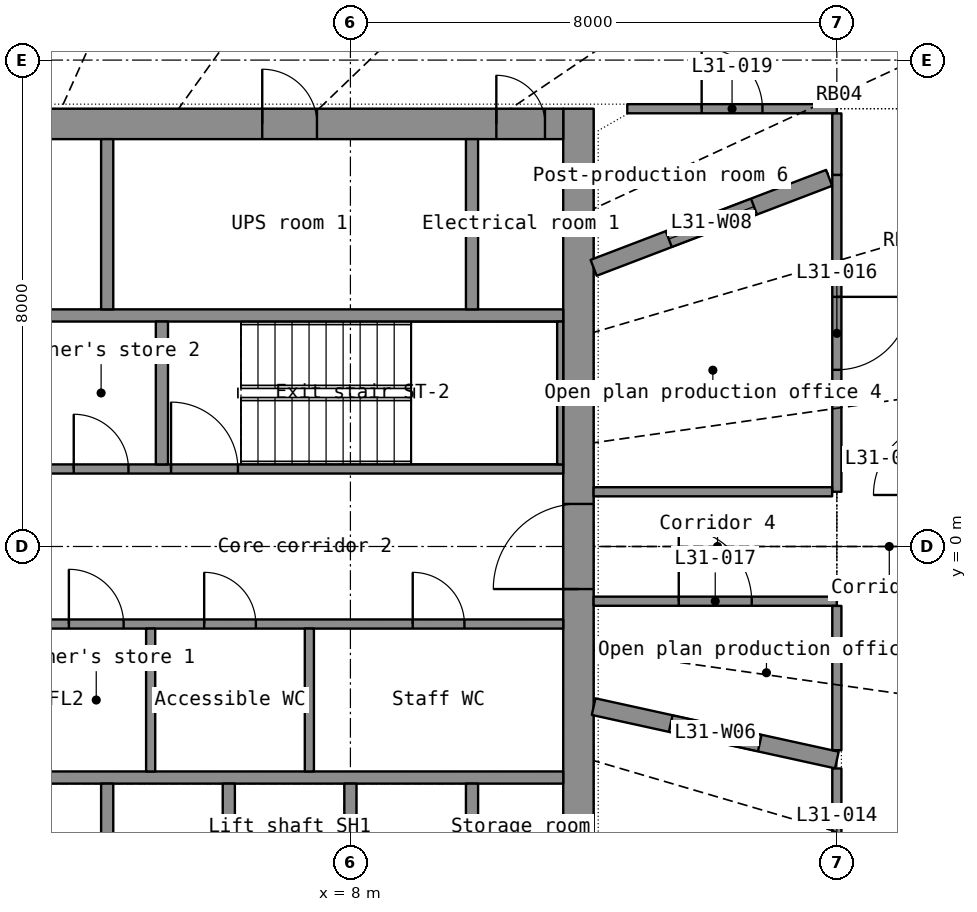
"""IFC4 building model, lengths in metres.
Left out: names, types, materials, properties, quantities, classifications, styles, units other than length and angle.
Written with IfcOpenShell. Run it as: python <this file> out.ifc"""

import sys

from ifc_helpers import new_model, si_unit, direction, frame, frame_2d, origin, place, context, subcontext, project, spatial, rectangle, extrude, element, fill, save


model = new_model("IFC4")
c1 = context("Model", 3, precision=1e-05, world=origin(), true_north=direction((0.0, 1.0)))
c2 = subcontext(c1, "Body", "Model", "MODEL_VIEW")
j1 = project(units=[si_unit("LENGTHUNIT", "METRE"), si_unit("PLANEANGLEUNIT", "RADIAN")], contexts=[c1])
p1 = place(None, origin())
s1 = spatial("IfcSite", under=j1, at=p1, CompositionType="ELEMENT")
p2 = place(p1, origin())
s2 = spatial("IfcBuilding", under=s1, at=p2, CompositionType="ELEMENT")
p3 = place(p2, frame((0.0, 0.0, 130.4)))
s3 = spatial("IfcBuildingStorey", under=s2, at=p3, CompositionType="ELEMENT", Elevation=130.4)
p4 = place(p3, frame((11.75, -7.2, 0.0), z_axis=(0.0, 0.0, 1.0), x_axis=(0.0, 1.0, 0.0)))
e1 = element("IfcWall", 1, at=p4, inside=s3, PredefinedType="SHEAR", context=c2, shape_type="SweptSolid", body=[
    extrude(rectangle(XDim=14.4, YDim=0.5, at=frame_2d((7.2, 0.0))), origin(), (0.0, 0.0, 1.0), 3.3),
])
p5 = place(p4, frame((6.5, 0.0, 0.0)))
e2 = element("IfcOpeningElement", 2, at=p5, cuts=e1, PredefinedType="OPENING", context=c2, shape_type="SweptSolid", body=[
    extrude(rectangle(XDim=1.4, YDim=2.2, at=frame_2d((0.7, 1.1))), frame((0.0, 0.26, 0.0), z_axis=(0.0, -1.0, 0.0), x_axis=(1.0, 0.0, 0.0)), (0.0, 0.0, 1.0), 0.52),
])
p6 = place(p3, frame((-11.5, 6.95, 0.0), z_axis=(0.0, 0.0, 1.0), x_axis=(1.0, 0.0, 0.0)))
e3 = element("IfcWall", 3, at=p6, inside=s3, PredefinedType="SHEAR", context=c2, shape_type="SweptSolid", body=[
    extrude(rectangle(XDim=23.0, YDim=0.5, at=frame_2d((11.5, 0.0))), origin(), (0.0, 0.0, 1.0), 3.3),
])
p7 = place(p6, frame((1.95, 0.0, 0.0)))
e4 = element("IfcOpeningElement", 4, at=p7, cuts=e3, PredefinedType="OPENING", context=c2, shape_type="SweptSolid", body=[
    extrude(rectangle(XDim=1.1, YDim=2.2, at=frame_2d((0.55, 1.1))), frame((0.0, 0.26, 0.0), z_axis=(0.0, -1.0, 0.0), x_axis=(1.0, 0.0, 0.0)), (0.0, 0.0, 1.0), 0.52),
])
p8 = place(p6, frame((10.05, 0.0, 0.0)))
e5 = element("IfcOpeningElement", 5, at=p8, cuts=e3, PredefinedType="OPENING", context=c2, shape_type="SweptSolid", body=[
    extrude(rectangle(XDim=0.9, YDim=2.1, at=frame_2d((0.45, 1.05))), frame((0.0, 0.26, 0.0), z_axis=(0.0, -1.0, 0.0), x_axis=(1.0, 0.0, 0.0)), (0.0, 0.0, 1.0), 0.52),
])
p9 = place(p6, frame((18.05, 0.0, 0.0)))
e6 = element("IfcOpeningElement", 6, at=p9, cuts=e3, PredefinedType="OPENING", context=c2, shape_type="SweptSolid", body=[
    extrude(rectangle(XDim=0.9, YDim=2.1, at=frame_2d((0.45, 1.05))), frame((0.0, 0.26, 0.0), z_axis=(0.0, -1.0, 0.0), x_axis=(1.0, 0.0, 0.0)), (0.0, 0.0, 1.0), 0.52),
])
p10 = place(p6, frame((0.3, 0.0, 0.0)))
e7 = element("IfcOpeningElement", 7, at=p10, cuts=e3, PredefinedType="OPENING", context=c2, shape_type="SweptSolid", body=[
    extrude(rectangle(XDim=0.8, YDim=2.05, at=frame_2d((0.4, 1.025))), frame((0.0, 0.26, 0.0), z_axis=(0.0, -1.0, 0.0), x_axis=(1.0, 0.0, 0.0)), (0.0, 0.0, 1.0), 0.52),
])
p11 = place(p6, frame((21.9, 0.0, 0.0)))
e8 = element("IfcOpeningElement", 8, at=p11, cuts=e3, PredefinedType="OPENING", context=c2, shape_type="SweptSolid", body=[
    extrude(rectangle(XDim=0.8, YDim=2.05, at=frame_2d((0.4, 1.025))), frame((0.0, 0.26, 0.0), z_axis=(0.0, -1.0, 0.0), x_axis=(1.0, 0.0, 0.0)), (0.0, 0.0, 1.0), 0.52),
])
for number, where, z_axis, x_axis in (
    (9, (-11.5, -3.8, 0.0), (0.0, 0.0, 1.0), (1.0, 0.0, 0.0)),
    (10, (-11.5, 3.8, 0.0), (0.0, 0.0, 1.0), (1.0, 0.0, 0.0)),
):
    element("IfcWall", number, at=place(p3, frame(where, z_axis=z_axis, x_axis=x_axis)), inside=s3, PredefinedType="SHEAR", context=c2, shape_type="SweptSolid", body=[
        extrude(rectangle(XDim=23.0, YDim=0.2, at=frame_2d((11.5, 0.0))), origin(), (0.0, 0.0, 1.0), 3.3),
    ])
for number, where, z_axis, x_axis in (
    (11, (4.0, -6.7, 0.0), (0.0, 0.0, 1.0), (0.0, 1.0, 0.0)),
    (12, (6.0, -6.7, 0.0), (0.0, 0.0, 1.0), (0.0, 1.0, 0.0)),
    (13, (8.0, -6.7, 0.0), (0.0, 0.0, 1.0), (0.0, 1.0, 0.0)),
    (14, (10.0, -6.7, 0.0), (0.0, 0.0, 1.0), (0.0, 1.0, 0.0)),
    (15, (10.0, 3.9, 0.0), (0.0, 0.0, 1.0), (0.0, 1.0, 0.0)),
):
    element("IfcWall", number, at=place(p3, frame(where, z_axis=z_axis, x_axis=x_axis)), inside=s3, PredefinedType="SHEAR", context=c2, shape_type="SweptSolid", body=[
        extrude(rectangle(XDim=2.8, YDim=0.2, at=frame_2d((1.4, 0.0))), origin(), (0.0, 0.0, 1.0), 3.3),
    ])
p12 = place(p3, frame((4.0, 3.9, 0.0), z_axis=(0.0, 0.0, 1.0), x_axis=(0.0, 1.0, 0.0)))
e16 = element("IfcWall", 16, at=p12, inside=s3, PredefinedType="PARTITIONING", context=c2, shape_type="SweptSolid", body=[
    extrude(rectangle(XDim=2.8, YDim=0.2, at=frame_2d((1.4, 0.0))), origin(), (0.0, 0.0, 1.0), 3.3),
])
p13 = place(p3, frame((3.0, -1.275, 0.0), z_axis=(0.0, 0.0, 1.0), x_axis=(1.0, 0.0, 0.0)))
e17 = element("IfcWall", 17, at=p13, inside=s3, PredefinedType="PARTITIONING", context=c2, shape_type="SweptSolid", body=[
    extrude(rectangle(XDim=8.5, YDim=0.15, at=frame_2d((4.25, 0.0))), origin(), (0.0, 0.0, 1.0), 3.3),
])
p14 = place(p13, frame((0.37, 0.0, 0.0)))
e18 = element("IfcOpeningElement", 18, at=p14, cuts=e17, PredefinedType="OPENING", context=c2, shape_type="SweptSolid", body=[
    extrude(rectangle(XDim=0.9, YDim=2.1, at=frame_2d((0.45, 1.05))), frame((0.0, 0.085, 0.0), z_axis=(0.0, -1.0, 0.0), x_axis=(1.0, 0.0, 0.0)), (0.0, 0.0, 1.0), 0.17),
])
p15 = place(p13, frame((2.595, 0.0, 0.0)))
e19 = element("IfcOpeningElement", 19, at=p15, cuts=e17, PredefinedType="OPENING", context=c2, shape_type="SweptSolid", body=[
    extrude(rectangle(XDim=0.85, YDim=2.1, at=frame_2d((0.425, 1.05))), frame((0.0, 0.085, 0.0), z_axis=(0.0, -1.0, 0.0), x_axis=(1.0, 0.0, 0.0)), (0.0, 0.0, 1.0), 0.17),
])
p16 = place(p13, frame((6.025, 0.0, 0.0)))
e20 = element("IfcOpeningElement", 20, at=p16, cuts=e17, PredefinedType="OPENING", context=c2, shape_type="SweptSolid", body=[
    extrude(rectangle(XDim=0.85, YDim=2.1, at=frame_2d((0.425, 1.05))), frame((0.0, 0.085, 0.0), z_axis=(0.0, -1.0, 0.0), x_axis=(1.0, 0.0, 0.0)), (0.0, 0.0, 1.0), 0.17),
])
p17 = place(p3, frame((3.0, 1.275, 0.0), z_axis=(0.0, 0.0, 1.0), x_axis=(1.0, 0.0, 0.0)))
e21 = element("IfcWall", 21, at=p17, inside=s3, PredefinedType="SHEAR", context=c2, shape_type="SweptSolid", body=[
    extrude(rectangle(XDim=8.5, YDim=0.15, at=frame_2d((4.25, 0.0))), origin(), (0.0, 0.0, 1.0), 3.3),
])
p18 = place(p17, frame((2.05, 0.0, 0.0)))
e22 = element("IfcOpeningElement", 22, at=p18, cuts=e21, PredefinedType="OPENING", context=c2, shape_type="SweptSolid", body=[
    extrude(rectangle(XDim=1.1, YDim=2.15, at=frame_2d((0.55, 1.075))), frame((0.0, 0.085, 0.0), z_axis=(0.0, -1.0, 0.0), x_axis=(1.0, 0.0, 0.0)), (0.0, 0.0, 1.0), 0.17),
])
p19 = place(p17, frame((0.45, 0.0, 0.0)))
e23 = element("IfcOpeningElement", 23, at=p19, cuts=e21, PredefinedType="OPENING", context=c2, shape_type="SweptSolid", body=[
    extrude(rectangle(XDim=0.9, YDim=2.1, at=frame_2d((0.45, 1.05))), frame((0.0, 0.085, 0.0), z_axis=(0.0, -1.0, 0.0), x_axis=(1.0, 0.0, 0.0)), (0.0, 0.0, 1.0), 0.17),
])
p20 = place(p3, frame((11.45, 1.35, 0.0), z_axis=(0.0, 0.0, 1.0), x_axis=(0.0, 1.0, 0.0)))
e24 = element("IfcWall", 24, at=p20, inside=s3, PredefinedType="SHEAR", context=c2, shape_type="SweptSolid", body=[
    extrude(rectangle(XDim=2.35, YDim=0.1, at=frame_2d((1.175, 0.0))), origin(), (0.0, 0.0, 1.0), 3.3),
])
p21 = place(p3, frame((4.9, 1.35, 0.0), z_axis=(0.0, 0.0, 1.0), x_axis=(0.0, 1.0, 0.0)))
e25 = element("IfcWall", 25, at=p21, inside=s3, PredefinedType="SHEAR", context=c2, shape_type="SweptSolid", body=[
    extrude(rectangle(XDim=2.35, YDim=0.2, at=frame_2d((1.175, 0.0))), origin(), (0.0, 0.0, 1.0), 3.3),
])
for number, where, z_axis, x_axis in (
    (26, (4.715, -3.7, 0.0), (0.0, 0.0, 1.0), (0.0, 1.0, 0.0)),
    (27, (7.325, -3.7, 0.0), (0.0, 0.0, 1.0), (0.0, 1.0, 0.0)),
):
    element("IfcWall", number, at=place(p3, frame(where, z_axis=z_axis, x_axis=x_axis)), inside=s3, PredefinedType="PARTITIONING", context=c2, shape_type="SweptSolid", body=[
        extrude(rectangle(XDim=2.35, YDim=0.15, at=frame_2d((1.175, 0.0))), origin(), (0.0, 0.0, 1.0), 3.3),
    ])
p22 = place(p3, frame((16.0, 6.111, 0.0), z_axis=(0.0, 0.0, 1.0), x_axis=(0.0, -1.0, 0.0)))
e28 = element("IfcWall", 28, at=p22, inside=s3, PredefinedType="PARTITIONING", context=c2, shape_type="SweptSolid", body=[
    extrude(rectangle(XDim=5.211, YDim=0.15, at=frame_2d((2.606, 0.0))), origin(), (0.0, 0.0, 1.0), 2.4),
])
p23 = place(p22, frame((2.006, 0.0, 0.0)))
e29 = element("IfcOpeningElement", 29, at=p23, cuts=e28, PredefinedType="OPENING", context=c2, shape_type="SweptSolid", body=[
    extrude(rectangle(XDim=1.2, YDim=2.2, at=frame_2d((0.6, 1.1))), frame((0.0, 0.085, 0.0), z_axis=(0.0, -1.0, 0.0), x_axis=(1.0, 0.0, 0.0)), (0.0, 0.0, 1.0), 0.17),
])
p24 = place(p3, frame((15.873, 6.063, 0.0), z_axis=(0.0, 0.0, 1.0), x_axis=(-0.934170215, -0.356827703, 0.0)))
e30 = element("IfcWall", 30, at=p24, inside=s3, PredefinedType="PARTITIONING", context=c2, shape_type="SweptSolid", body=[
    extrude(rectangle(XDim=4.146, YDim=0.28, at=frame_2d((2.073, 0.0))), origin(), (0.0, 0.0, 1.0), 2.4),
])
p25 = place(p24, frame((1.323, 0.0, 1.0)))
e31 = element("IfcOpeningElement", 31, at=p25, cuts=e30, PredefinedType="OPENING", context=c2, shape_type="SweptSolid", body=[
    extrude(rectangle(XDim=1.5, YDim=1.2, at=frame_2d((0.75, 0.6))), frame((0.0, 0.15, 0.0), z_axis=(0.0, -1.0, 0.0), x_axis=(1.0, 0.0, 0.0)), (0.0, 0.0, 1.0), 0.3),
])
p26 = place(p3, frame((16.0, -3.512, 0.0), z_axis=(0.0, 0.0, 1.0), x_axis=(-0.976750433, 0.214379551, 0.0)))
e32 = element("IfcWall", 32, at=p26, inside=s3, PredefinedType="PARTITIONING", context=c2, shape_type="SweptSolid", body=[
    extrude(rectangle(XDim=4.095, YDim=0.28, at=frame_2d((2.048, 0.0))), origin(), (0.0, 0.0, 1.0), 2.4),
])
p27 = place(p26, frame((1.298, 0.0, 1.0)))
e33 = element("IfcOpeningElement", 33, at=p27, cuts=e32, PredefinedType="OPENING", context=c2, shape_type="SweptSolid", body=[
    extrude(rectangle(XDim=1.5, YDim=1.2, at=frame_2d((0.75, 0.6))), frame((0.0, 0.15, 0.0), z_axis=(0.0, -1.0, 0.0), x_axis=(1.0, 0.0, 0.0)), (0.0, 0.0, 1.0), 0.3),
])
p28 = place(p3, frame((12.0, -0.9, 0.0), z_axis=(0.0, 0.0, 1.0), x_axis=(1.0, 0.0, 0.0)))
e34 = element("IfcWall", 34, at=p28, inside=s3, PredefinedType="PARTITIONING", context=c2, shape_type="SweptSolid", body=[
    extrude(rectangle(XDim=4.0, YDim=0.15, at=frame_2d((2.0, 0.0))), origin(), (0.0, 0.0, 1.0), 2.4),
])
p29 = place(p28, frame((1.4, 0.0, 0.0)))
e35 = element("IfcOpeningElement", 35, at=p29, cuts=e34, PredefinedType="OPENING", context=c2, shape_type="SweptSolid", body=[
    extrude(rectangle(XDim=1.2, YDim=2.2, at=frame_2d((0.6, 1.1))), frame((0.0, 0.085, 0.0), z_axis=(0.0, -1.0, 0.0), x_axis=(1.0, 0.0, 0.0)), (0.0, 0.0, 1.0), 0.17),
])
p30 = place(p3, frame((15.923, 0.9, 0.0), z_axis=(0.0, 0.0, 1.0), x_axis=(-1.0, 0.0, 0.0)))
e36 = element("IfcWall", 36, at=p30, inside=s3, PredefinedType="PARTITIONING", context=c2, shape_type="SweptSolid", body=[
    extrude(rectangle(XDim=3.923, YDim=0.15, at=frame_2d((1.961, 0.0))), origin(), (0.0, 0.0, 1.0), 2.4),
])
p31 = place(p3, frame((16.0, -3.65, 0.0), z_axis=(0.0, 0.0, 1.0), x_axis=(0.0, -1.0, 0.0)))
e37 = element("IfcWall", 37, at=p31, inside=s3, PredefinedType="PARTITIONING", context=c2, shape_type="SweptSolid", body=[
    extrude(rectangle(XDim=3.55, YDim=0.15, at=frame_2d((1.775, 0.0))), origin(), (0.0, 0.0, 1.0), 2.4),
])
p32 = place(p31, frame((1.275, 0.0, 0.0)))
e38 = element("IfcOpeningElement", 38, at=p32, cuts=e37, PredefinedType="OPENING", context=c2, shape_type="SweptSolid", body=[
    extrude(rectangle(XDim=1.0, YDim=2.2, at=frame_2d((0.5, 1.1))), frame((0.0, 0.085, 0.0), z_axis=(0.0, -1.0, 0.0), x_axis=(1.0, 0.0, 0.0)), (0.0, 0.0, 1.0), 0.17),
])
p33 = place(p3, frame((12.553, 7.2, 0.0), z_axis=(0.0, 0.0, 1.0), x_axis=(1.0, 0.0, 0.0)))
e39 = element("IfcWall", 39, at=p33, inside=s3, PredefinedType="PARTITIONING", context=c2, shape_type="SweptSolid", body=[
    extrude(rectangle(XDim=3.447, YDim=0.15, at=frame_2d((1.723, 0.0))), origin(), (0.0, 0.0, 1.0), 2.4),
])
p34 = place(p33, frame((1.223, 0.0, 0.0)))
e40 = element("IfcOpeningElement", 40, at=p34, cuts=e39, PredefinedType="OPENING", context=c2, shape_type="SweptSolid", body=[
    extrude(rectangle(XDim=1.0, YDim=2.2, at=frame_2d((0.5, 1.1))), frame((0.0, 0.085, 0.0), z_axis=(0.0, -1.0, 0.0), x_axis=(1.0, 0.0, 0.0)), (0.0, 0.0, 1.0), 0.17),
])
p35 = place(p3, frame((16.0, -0.977, 0.0), z_axis=(0.0, 0.0, 1.0), x_axis=(0.0, -1.0, 0.0)))
e41 = element("IfcWall", 41, at=p35, inside=s3, PredefinedType="PARTITIONING", context=c2, shape_type="SweptSolid", body=[
    extrude(rectangle(XDim=2.373, YDim=0.15, at=frame_2d((1.187, 0.0))), origin(), (0.0, 0.0, 1.0), 2.4),
])
p36 = place(p3, frame((16.0, 7.123, 0.0), z_axis=(0.0, 0.0, 1.0), x_axis=(0.0, -1.0, 0.0)))
e42 = element("IfcWall", 42, at=p36, inside=s3, PredefinedType="PARTITIONING", context=c2, shape_type="SweptSolid", body=[
    extrude(rectangle(XDim=1.011, YDim=0.15, at=frame_2d((0.505, 0.0))), origin(), (0.0, 0.0, 1.0), 2.4),
])
p37 = place(p9, origin())
e43 = element("IfcDoor", 43, at=p37, inside=s3, OperationType="SINGLE_SWING_LEFT", PredefinedType="DOOR", context=c2, shape_type="SweptSolid", body=[
    extrude(rectangle(XDim=0.9, YDim=2.1, at=frame_2d((0.45, 1.05))), frame((0.0, 0.025, 0.0), z_axis=(0.0, -1.0, 0.0), x_axis=(1.0, 0.0, 0.0)), (0.0, 0.0, 1.0), 0.05),
])
fill(e6, e43)
p38 = place(p11, origin())
e44 = element("IfcDoor", 44, at=p38, inside=s3, OperationType="SINGLE_SWING_LEFT", PredefinedType="DOOR", context=c2, shape_type="SweptSolid", body=[
    extrude(rectangle(XDim=0.8, YDim=2.05, at=frame_2d((0.4, 1.025))), frame((0.0, 0.025, 0.0), z_axis=(0.0, -1.0, 0.0), x_axis=(1.0, 0.0, 0.0)), (0.0, 0.0, 1.0), 0.05),
])
fill(e8, e44)
p39 = place(p5, origin())
e45 = element("IfcDoor", 45, at=p39, inside=s3, OperationType="DOUBLE_DOOR_SINGLE_SWING", PredefinedType="DOOR", context=c2, shape_type="SweptSolid", body=[
    extrude(rectangle(XDim=1.4, YDim=2.2, at=frame_2d((0.7, 1.1))), frame((0.0, 0.025, 0.0), z_axis=(0.0, -1.0, 0.0), x_axis=(1.0, 0.0, 0.0)), (0.0, 0.0, 1.0), 0.05),
])
fill(e2, e45)
p40 = place(p18, origin())
e46 = element("IfcDoor", 46, at=p40, inside=s3, OperationType="SINGLE_SWING_LEFT", PredefinedType="DOOR", context=c2, shape_type="SweptSolid", body=[
    extrude(rectangle(XDim=1.1, YDim=2.15, at=frame_2d((0.55, 1.075))), frame((0.0, 0.025, 0.0), z_axis=(0.0, -1.0, 0.0), x_axis=(1.0, 0.0, 0.0)), (0.0, 0.0, 1.0), 0.05),
])
fill(e22, e46)
p41 = place(p14, origin())
e47 = element("IfcDoor", 47, at=p41, inside=s3, OperationType="SINGLE_SWING_LEFT", PredefinedType="DOOR", context=c2, shape_type="SweptSolid", body=[
    extrude(rectangle(XDim=0.9, YDim=2.1, at=frame_2d((0.45, 1.05))), frame((0.0, 0.025, 0.0), z_axis=(0.0, -1.0, 0.0), x_axis=(1.0, 0.0, 0.0)), (0.0, 0.0, 1.0), 0.05),
])
fill(e18, e47)
p42 = place(p15, origin())
e48 = element("IfcDoor", 48, at=p42, inside=s3, OperationType="SINGLE_SWING_LEFT", PredefinedType="DOOR", context=c2, shape_type="SweptSolid", body=[
    extrude(rectangle(XDim=0.85, YDim=2.1, at=frame_2d((0.425, 1.05))), frame((0.0, 0.025, 0.0), z_axis=(0.0, -1.0, 0.0), x_axis=(1.0, 0.0, 0.0)), (0.0, 0.0, 1.0), 0.05),
])
fill(e19, e48)
p43 = place(p16, origin())
e49 = element("IfcDoor", 49, at=p43, inside=s3, OperationType="SINGLE_SWING_LEFT", PredefinedType="DOOR", context=c2, shape_type="SweptSolid", body=[
    extrude(rectangle(XDim=0.85, YDim=2.1, at=frame_2d((0.425, 1.05))), frame((0.0, 0.025, 0.0), z_axis=(0.0, -1.0, 0.0), x_axis=(1.0, 0.0, 0.0)), (0.0, 0.0, 1.0), 0.05),
])
fill(e20, e49)
p44 = place(p19, origin())
e50 = element("IfcDoor", 50, at=p44, inside=s3, OperationType="SINGLE_SWING_LEFT", PredefinedType="DOOR", context=c2, shape_type="SweptSolid", body=[
    extrude(rectangle(XDim=0.9, YDim=2.1, at=frame_2d((0.45, 1.05))), frame((0.0, 0.025, 0.0), z_axis=(0.0, -1.0, 0.0), x_axis=(1.0, 0.0, 0.0)), (0.0, 0.0, 1.0), 0.05),
])
fill(e23, e50)
p45 = place(p23, origin())
e51 = element("IfcDoor", 51, at=p45, inside=s3, OperationType="DOUBLE_DOOR_SINGLE_SWING", PredefinedType="DOOR", context=c2, shape_type="SweptSolid", body=[
    extrude(rectangle(XDim=1.2, YDim=2.2, at=frame_2d((0.6, 1.1))), frame((0.0, 0.025, 0.0), z_axis=(0.0, -1.0, 0.0), x_axis=(1.0, 0.0, 0.0)), (0.0, 0.0, 1.0), 0.05),
])
fill(e29, e51)
p46 = place(p29, origin())
e52 = element("IfcDoor", 52, at=p46, inside=s3, OperationType="DOUBLE_DOOR_SINGLE_SWING", PredefinedType="DOOR", context=c2, shape_type="SweptSolid", body=[
    extrude(rectangle(XDim=1.2, YDim=2.2, at=frame_2d((0.6, 1.1))), frame((0.0, 0.025, 0.0), z_axis=(0.0, -1.0, 0.0), x_axis=(1.0, 0.0, 0.0)), (0.0, 0.0, 1.0), 0.05),
])
fill(e35, e52)
p47 = place(p34, origin())
e53 = element("IfcDoor", 53, at=p47, inside=s3, OperationType="SINGLE_SWING_LEFT", PredefinedType="DOOR", context=c2, shape_type="SweptSolid", body=[
    extrude(rectangle(XDim=1.0, YDim=2.2, at=frame_2d((0.5, 1.1))), frame((0.0, 0.025, 0.0), z_axis=(0.0, -1.0, 0.0), x_axis=(1.0, 0.0, 0.0)), (0.0, 0.0, 1.0), 0.05),
])
fill(e40, e53)
p48 = place(p27, origin())
e54 = element("IfcWindow", 54, at=p48, inside=s3, PartitioningType="SINGLE_PANEL", PredefinedType="WINDOW", context=c2, shape_type="SweptSolid", body=[
    extrude(rectangle(XDim=1.5, YDim=1.2, at=frame_2d((0.75, 0.6))), frame((0.0, 0.03, 0.0), z_axis=(0.0, -1.0, 0.0), x_axis=(1.0, 0.0, 0.0)), (0.0, 0.0, 1.0), 0.06),
])
fill(e33, e54)
p49 = place(p25, origin())
e55 = element("IfcWindow", 55, at=p49, inside=s3, PartitioningType="SINGLE_PANEL", PredefinedType="WINDOW", context=c2, shape_type="SweptSolid", body=[
    extrude(rectangle(XDim=1.5, YDim=1.2, at=frame_2d((0.75, 0.6))), frame((0.0, 0.03, 0.0), z_axis=(0.0, -1.0, 0.0), x_axis=(1.0, 0.0, 0.0)), (0.0, 0.0, 1.0), 0.06),
])
fill(e31, e55)
save(model, sys.argv[1])
